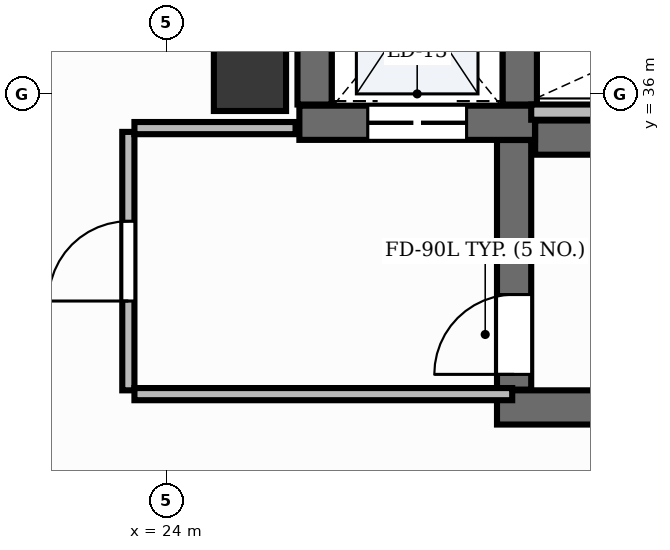
"""IFC4 building model, lengths in metres.
Left out: names, types, materials, properties, quantities, classifications, styles, units other than length and angle.
Written with IfcOpenShell. Run it as: python <this file> out.ifc"""

import sys

from ifc_helpers import new_model, si_unit, direction, frame, frame_2d, origin, origin_2d, place, context, subcontext, project, spatial, rectangle, extrude, element, fill, save


model = new_model("IFC4")
c1 = context("Model", 3, precision=1e-05, world=origin(), true_north=direction((0.0, 1.0)))
c2 = subcontext(c1, "Body", "Model", "MODEL_VIEW")
j1 = project(units=[si_unit("LENGTHUNIT", "METRE"), si_unit("PLANEANGLEUNIT", "RADIAN")], contexts=[c1])
p1 = place(None, origin())
s1 = spatial("IfcSite", under=j1, at=p1, CompositionType="ELEMENT")
p2 = place(p1, origin())
s2 = spatial("IfcBuilding", under=s1, at=p2, CompositionType="ELEMENT")
p3 = place(p2, frame((0.0, 0.0, 55.2)))
s3 = spatial("IfcBuildingStorey", under=s2, at=p3, CompositionType="ELEMENT", Elevation=55.2)
p4 = place(p3, frame((28.852, 35.425, 0.0), z_axis=(0.0, 0.0, 1.0), x_axis=(1.0, 0.0, 0.0)))
e1 = element("IfcWall", 1, at=p4, inside=s3, PredefinedType="SHEAR", context=c2, shape_type="SweptSolid", body=[
    extrude(rectangle(XDim=8.248, YDim=0.45, at=frame_2d((4.124, 0.0))), origin(), (0.0, 0.0, 1.0), 3.9),
])
p5 = place(p3, frame((28.35, 31.875, 0.0), z_axis=(0.0, 0.0, 1.0), x_axis=(1.0, 0.0, 0.0)))
e2 = element("IfcWall", 2, at=p5, inside=s3, PredefinedType="SHEAR", context=c2, shape_type="SweptSolid", body=[
    extrude(rectangle(XDim=8.75, YDim=0.45, at=frame_2d((4.375, 0.0))), origin(), (0.0, 0.0, 1.0), 3.9),
])
p6 = place(p3, frame((28.575, 32.11, 0.0), z_axis=(0.0, 0.0, 1.0), x_axis=(0.0, 1.0, 0.0)))
e3 = element("IfcWall", 3, at=p6, inside=s3, PredefinedType="SHEAR", context=c2, shape_type="SweptSolid", body=[
    extrude(rectangle(XDim=3.283, YDim=0.45, at=frame_2d((1.642, 0.0))), origin(), (0.0, 0.0, 1.0), 3.9),
])
p7 = place(p6, frame((0.2, 0.0, 0.0)))
e4 = element("IfcOpeningElement", 4, at=p7, cuts=e3, PredefinedType="OPENING", context=c2, shape_type="SweptSolid", body=[
    extrude(rectangle(XDim=1.05, YDim=2.15, at=frame_2d((0.525, 1.075))), frame((0.0, 0.24, 0.0), z_axis=(0.0, -1.0, 0.0), x_axis=(1.0, 0.0, 0.0)), (0.0, 0.0, 1.0), 0.48),
])
p8 = place(p3, frame((25.75, 35.62, 0.0), z_axis=(0.0, 0.0, 1.0), x_axis=(1.0, 0.0, 0.0)))
e5 = element("IfcWall", 5, at=p8, inside=s3, PredefinedType="SHEAR", context=c2, shape_type="SweptSolid", body=[
    extrude(rectangle(XDim=3.1, YDim=0.45, at=frame_2d((1.55, 0.0))), origin(), (0.0, 0.0, 1.0), 3.9),
])
p9 = place(p8, frame((0.9, 0.0, 0.0)))
e6 = element("IfcOpeningElement", 6, at=p9, cuts=e5, PredefinedType="OPENING", context=c2, shape_type="SweptSolid", body=[
    extrude(rectangle(XDim=1.3, YDim=2.2, at=frame_2d((0.65, 1.1))), frame((0.0, 0.24, 0.0), z_axis=(0.0, -1.0, 0.0), x_axis=(1.0, 0.0, 0.0)), (0.0, 0.0, 1.0), 0.48),
])
for number, where, z_axis, x_axis in (
    (7, (25.95, 35.86, 0.0), (0.0, 0.0, 1.0), (0.0, 1.0, 0.0)),
    (8, (28.65, 35.86, 0.0), (0.0, 0.0, 1.0), (0.0, 1.0, 0.0)),
):
    element("IfcWall", number, at=place(p3, frame(where, z_axis=z_axis, x_axis=x_axis)), inside=s3, PredefinedType="SHEAR", context=c2, shape_type="SweptSolid", body=[
        extrude(rectangle(XDim=2.7, YDim=0.45, at=frame_2d((1.35, 0.0))), origin(), (0.0, 0.0, 1.0), 3.9),
    ])
p10 = place(p3, frame((25.1, 36.25, -0.0), z_axis=(0.0, 0.0, 1.0), x_axis=(1.0, 0.0, 0.0)))
e9 = element("IfcColumn", 9, at=p10, inside=s3, PredefinedType="PILASTER", context=c2, shape_type="SweptSolid", body=[
    extrude(rectangle(XDim=0.95, YDim=0.95, at=origin_2d()), origin(), (0.0, 0.0, 1.0), 3.901),
])
p11 = place(p3, frame((28.8, 35.76, 0.0), z_axis=(0.0, 0.0, 1.0), x_axis=(1.0, 0.0, 0.0)))
e10 = element("IfcWall", 10, at=p11, inside=s3, PredefinedType="PARTITIONING", context=c2, shape_type="SweptSolid", body=[
    extrude(rectangle(XDim=4.57, YDim=0.2, at=frame_2d((2.285, 0.0))), origin(), (0.0, 0.0, 1.0), 2.91),
])
p12 = place(p3, frame((23.5, 32.1, 0.0), z_axis=(0.0, 0.0, 1.0), x_axis=(0.0, 1.0, 0.0)))
e11 = element("IfcWall", 11, at=p12, inside=s3, PredefinedType="PARTITIONING", context=c2, shape_type="SweptSolid", body=[
    extrude(rectangle(XDim=3.4, YDim=0.16, at=frame_2d((1.7, 0.0))), origin(), (0.0, 0.0, 1.0), 2.91),
])
p13 = place(p12, frame((1.175, 0.0, 0.0)))
e12 = element("IfcOpeningElement", 12, at=p13, cuts=e11, PredefinedType="OPENING", context=c2, shape_type="SweptSolid", body=[
    extrude(rectangle(XDim=1.05, YDim=2.15, at=frame_2d((0.525, 1.075))), frame((0.0, 0.095, 0.0), z_axis=(0.0, -1.0, 0.0), x_axis=(1.0, 0.0, 0.0)), (0.0, 0.0, 1.0), 0.19),
])
p14 = place(p3, frame((23.58, 32.05, 0.0), z_axis=(0.0, 0.0, 1.0), x_axis=(1.0, 0.0, 0.0)))
e13 = element("IfcWall", 13, at=p14, inside=s3, PredefinedType="PARTITIONING", context=c2, shape_type="SweptSolid", body=[
    extrude(rectangle(XDim=4.97, YDim=0.16, at=frame_2d((2.485, 0.0))), origin(), (0.0, 0.0, 1.0), 2.91),
])
p15 = place(p3, frame((23.58, 35.55, 0.0), z_axis=(0.0, 0.0, 1.0), x_axis=(1.0, 0.0, 0.0)))
e14 = element("IfcWall", 14, at=p15, inside=s3, PredefinedType="PARTITIONING", context=c2, shape_type="SweptSolid", body=[
    extrude(rectangle(XDim=2.12, YDim=0.16, at=frame_2d((1.06, 0.0))), origin(), (0.0, 0.0, 1.0), 2.91),
])
p16 = place(p7, origin())
e15 = element("IfcDoor", 15, at=p16, inside=s3, OperationType="SINGLE_SWING_LEFT", PredefinedType="DOOR", context=c2, shape_type="SweptSolid", body=[
    extrude(rectangle(XDim=1.05, YDim=2.15, at=frame_2d((0.525, 1.075))), frame((0.0, 0.025, 0.0), z_axis=(0.0, -1.0, 0.0), x_axis=(1.0, 0.0, 0.0)), (0.0, 0.0, 1.0), 0.05),
])
fill(e4, e15)
p17 = place(p9, origin())
e16 = element("IfcDoor", 16, at=p17, inside=s3, OperationType="DOUBLE_DOOR_SLIDING", PredefinedType="DOOR", context=c2, shape_type="SweptSolid", body=[
    extrude(rectangle(XDim=1.3, YDim=2.2, at=frame_2d((0.65, 1.1))), frame((0.0, 0.025, 0.0), z_axis=(0.0, -1.0, 0.0), x_axis=(1.0, 0.0, 0.0)), (0.0, 0.0, 1.0), 0.05),
])
fill(e6, e16)
p18 = place(p13, origin())
e17 = element("IfcDoor", 17, at=p18, inside=s3, OperationType="SINGLE_SWING_LEFT", PredefinedType="DOOR", context=c2, shape_type="SweptSolid", body=[
    extrude(rectangle(XDim=1.05, YDim=2.15, at=frame_2d((0.525, 1.075))), frame((0.0, 0.025, 0.0), z_axis=(0.0, -1.0, 0.0), x_axis=(1.0, 0.0, 0.0)), (0.0, 0.0, 1.0), 0.05),
])
fill(e12, e17)
save(model, sys.argv[1])
